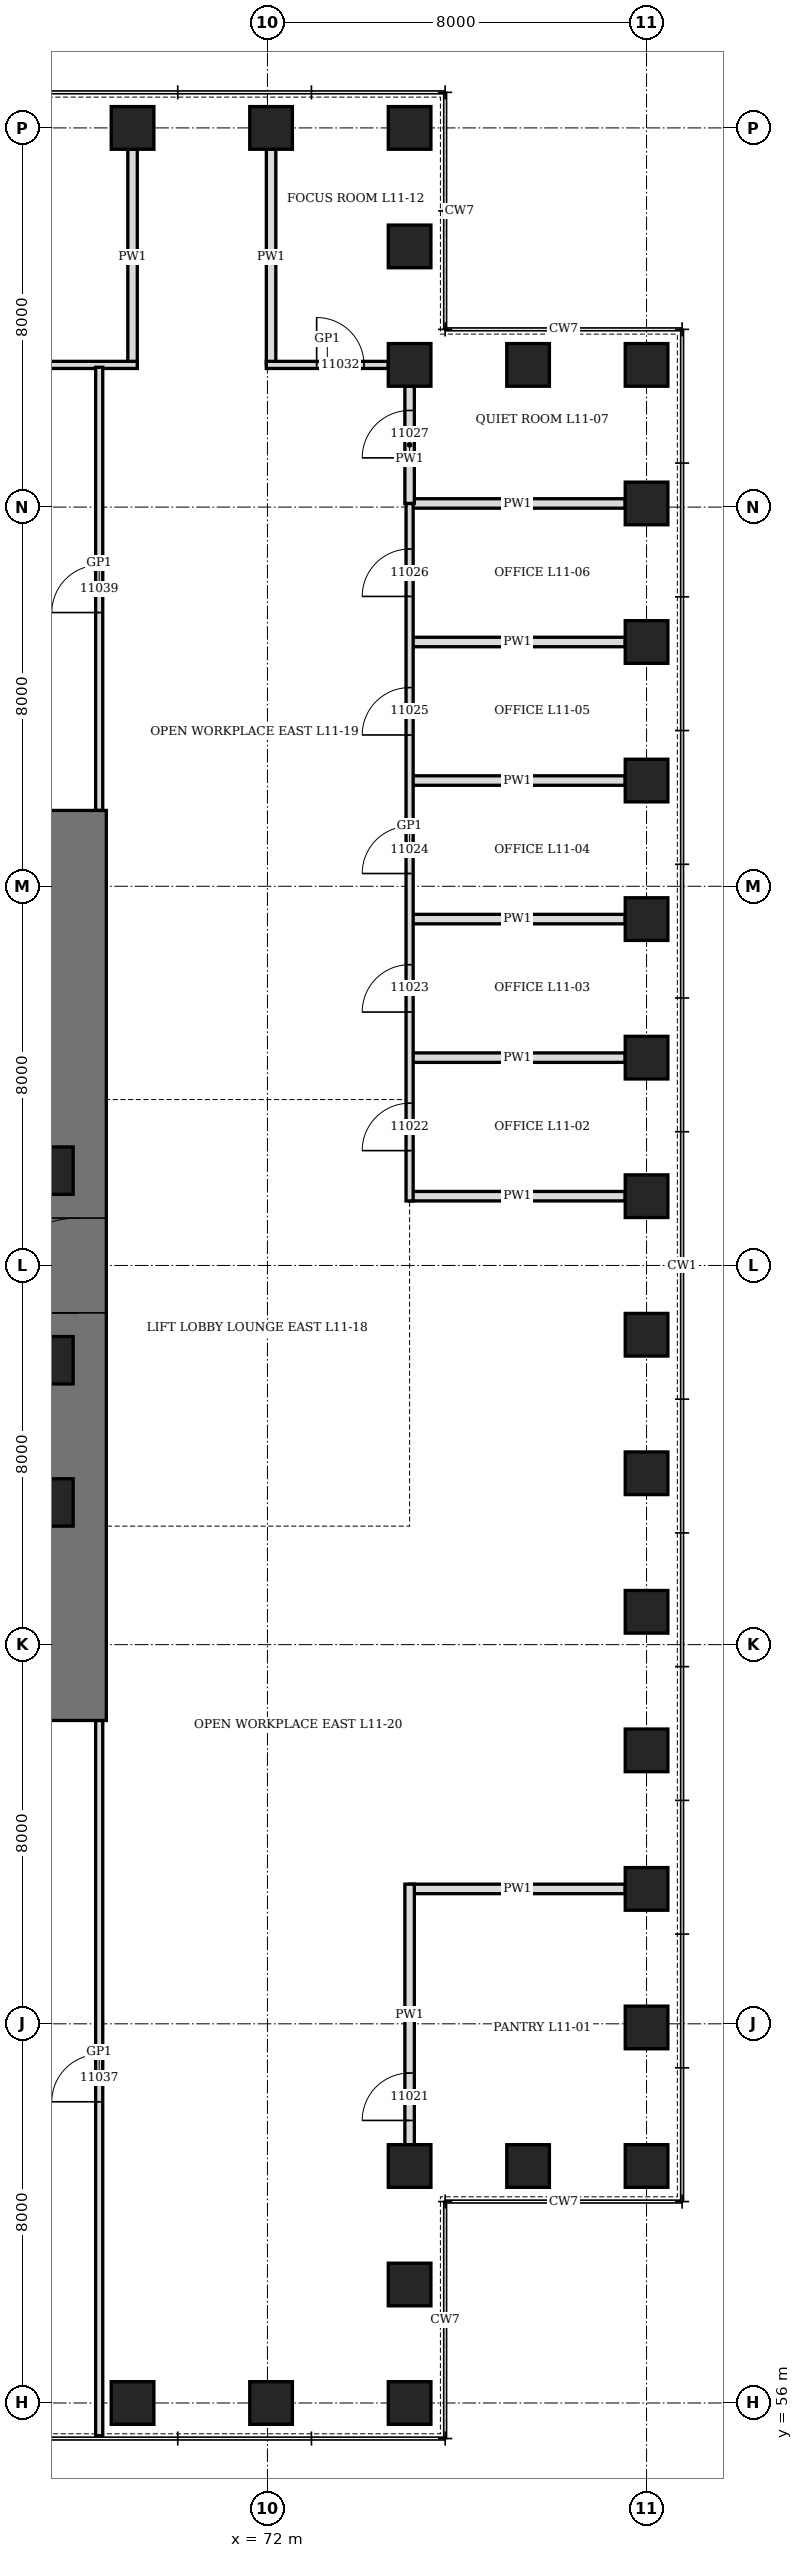
"""IFC4 building model, lengths in metres.
Left out: names, types, materials, properties, quantities, classifications, styles, units other than length and angle.
Written with IfcOpenShell. Run it as: python <this file> out.ifc"""

import sys

from ifc_helpers import new_model, si_unit, direction, frame, frame_2d, origin, origin_2d, place, context, subcontext, project, spatial, rectangle, hollow_rectangle, extrude, element, fill, save


model = new_model("IFC4")
c1 = context("Model", 3, precision=1e-05, world=origin(), true_north=direction((0.0, 1.0)))
c2 = subcontext(c1, "Body", "Model", "MODEL_VIEW")
j1 = project(units=[si_unit("LENGTHUNIT", "METRE"), si_unit("PLANEANGLEUNIT", "RADIAN")], contexts=[c1])
p1 = place(None, origin())
s1 = spatial("IfcSite", under=j1, at=p1, CompositionType="ELEMENT")
p2 = place(p1, origin())
s2 = spatial("IfcBuilding", under=s1, at=p2, CompositionType="ELEMENT")
p3 = place(p2, frame((0.0, 0.0, 55.9)))
s3 = spatial("IfcBuildingStorey", under=s2, at=p3, CompositionType="ELEMENT", Elevation=55.9)
for number, where, z_axis, x_axis in (
    (1, (69.154, 56.0, 0.0), (0.0, 0.0, 1.0), (1.0, 0.0, 0.0)),
    (2, (72.077, 56.0, 0.0), (0.0, 0.0, 1.0), (1.0, 0.0, 0.0)),
    (3, (75.0, 56.0, 0.0), (0.0, 0.0, 1.0), (0.0, 1.0, 0.0)),
    (4, (75.0, 58.5, 0.0), (0.0, 0.0, 1.0), (0.0, 1.0, 0.0)),
    (5, (75.0, 61.0, 0.0), (0.0, 0.0, 1.0), (1.0, 0.0, 0.0)),
    (6, (77.5, 61.0, 0.0), (0.0, 0.0, 1.0), (1.0, 0.0, 0.0)),
    (7, (80.0, 61.0, 0.0), (0.0, 0.0, 1.0), (0.0, 1.0, 0.0)),
    (8, (80.0, 63.923, 0.0), (0.0, 0.0, 1.0), (0.0, 1.0, 0.0)),
    (9, (80.0, 66.846, 0.0), (0.0, 0.0, 1.0), (0.0, 1.0, 0.0)),
    (10, (80.0, 69.769, 0.0), (0.0, 0.0, 1.0), (0.0, 1.0, 0.0)),
    (11, (80.0, 72.692, 0.0), (0.0, 0.0, 1.0), (0.0, 1.0, 0.0)),
    (12, (80.0, 75.615, 0.0), (0.0, 0.0, 1.0), (0.0, 1.0, 0.0)),
    (13, (80.0, 78.539, 0.0), (0.0, 0.0, 1.0), (0.0, 1.0, 0.0)),
    (14, (80.0, 81.461, 0.0), (0.0, 0.0, 1.0), (0.0, 1.0, 0.0)),
    (15, (80.0, 84.385, 0.0), (0.0, 0.0, 1.0), (0.0, 1.0, 0.0)),
    (16, (80.0, 87.308, 0.0), (0.0, 0.0, 1.0), (0.0, 1.0, 0.0)),
    (17, (80.0, 90.231, 0.0), (0.0, 0.0, 1.0), (0.0, 1.0, 0.0)),
    (18, (80.0, 93.154, 0.0), (0.0, 0.0, 1.0), (0.0, 1.0, 0.0)),
    (19, (80.0, 96.077, 0.0), (0.0, 0.0, 1.0), (0.0, 1.0, 0.0)),
    (20, (80.0, 99.0, 0.0), (0.0, 0.0, 1.0), (1.0, 0.0, 0.0)),
    (21, (77.5, 99.0, 0.0), (0.0, 0.0, 1.0), (1.0, 0.0, 0.0)),
    (22, (75.0, 99.0, 0.0), (0.0, 0.0, 1.0), (0.0, 1.0, 0.0)),
    (23, (75.0, 101.5, 0.0), (0.0, 0.0, 1.0), (0.0, 1.0, 0.0)),
    (24, (75.0, 104.0, 0.0), (0.0, 0.0, 1.0), (1.0, 0.0, 0.0)),
    (25, (72.077, 104.0, 0.0), (0.0, 0.0, 1.0), (1.0, 0.0, 0.0)),
    (26, (69.154, 104.0, 0.0), (0.0, 0.0, 1.0), (1.0, 0.0, 0.0)),
):
    element("IfcColumn", number, at=place(p3, frame(where, z_axis=z_axis, x_axis=x_axis)), inside=s3, PredefinedType="COLUMN", context=c2, shape_type="SweptSolid", body=[
        extrude(hollow_rectangle(XDim=0.9, YDim=0.9, WallThickness=0.12, at=origin_2d()), origin(), (0.0, 0.0, 1.0), 4.2),
    ])
p4 = place(p3, frame((68.0, 70.4, 0.0), z_axis=(0.0, 0.0, 1.0), x_axis=(0.0, 1.0, 0.0)))
e27 = element("IfcWall", 27, at=p4, inside=s3, PredefinedType="SHEAR", context=c2, shape_type="SweptSolid", body=[
    extrude(rectangle(XDim=19.2, YDim=1.2, at=frame_2d((9.6, 0.0))), origin(), (0.0, 0.0, 1.0), 4.2),
])
p5 = place(p4, frame((8.6, 0.0, 0.0)))
e28 = element("IfcOpeningElement", 28, at=p5, cuts=e27, PredefinedType="OPENING", context=c2, shape_type="SweptSolid", body=[
    extrude(rectangle(XDim=2.0, YDim=2.4, at=frame_2d((1.0, 1.2))), frame((0.0, 0.61, 0.0), z_axis=(0.0, -1.0, 0.0), x_axis=(1.0, 0.0, 0.0)), (0.0, 0.0, 1.0), 1.22),
])
for number, where, z_axis, x_axis in (
    (29, (67.4, 75.0, 0.0), (0.0, 0.0, 1.0), (1.0, 0.0, 0.0)),
    (30, (67.4, 78.0, 0.0), (0.0, 0.0, 1.0), (1.0, 0.0, 0.0)),
    (31, (67.4, 82.0, 0.0), (0.0, 0.0, 1.0), (1.0, 0.0, 0.0)),
):
    element("IfcColumn", number, at=place(p3, frame(where, z_axis=z_axis, x_axis=x_axis)), inside=s3, PredefinedType="COLUMN", context=c2, shape_type="SweptSolid", body=[
        extrude(hollow_rectangle(XDim=1.0, YDim=1.0, WallThickness=0.15, at=origin_2d()), origin(), (0.0, 0.0, 1.0), 4.2),
    ])
for number, where, z_axis, x_axis in (
    (32, (75.0, 66.846, 0.0), (0.0, 0.0, 1.0), (1.0, 0.0, 0.0)),
    (33, (75.0, 81.461, 0.0), (0.0, 0.0, 1.0), (1.0, 0.0, 0.0)),
    (34, (75.0, 84.385, 0.0), (0.0, 0.0, 1.0), (1.0, 0.0, 0.0)),
    (35, (75.0, 87.308, 0.0), (0.0, 0.0, 1.0), (1.0, 0.0, 0.0)),
    (36, (75.0, 90.231, 0.0), (0.0, 0.0, 1.0), (1.0, 0.0, 0.0)),
    (37, (75.0, 93.154, 0.0), (0.0, 0.0, 1.0), (1.0, 0.0, 0.0)),
    (38, (75.0, 96.077, 0.0), (0.0, 0.0, 1.0), (1.0, 0.0, 0.0)),
):
    element("IfcWall", number, at=place(p3, frame(where, z_axis=z_axis, x_axis=x_axis)), inside=s3, PredefinedType="PARTITIONING", context=c2, shape_type="SweptSolid", body=[
        extrude(rectangle(XDim=4.55, YDim=0.2, at=frame_2d((2.275, 0.0))), origin(), (0.0, 0.0, 1.0), 3.428),
    ])
p6 = place(p3, frame((69.154, 99.0, 0.0), z_axis=(0.0, 0.0, 1.0), x_axis=(0.0, 1.0, 0.0)))
e39 = element("IfcWall", 39, at=p6, inside=s3, PredefinedType="PARTITIONING", context=c2, shape_type="SweptSolid", body=[
    extrude(rectangle(XDim=4.55, YDim=0.2, at=frame_2d((2.275, 0.0))), origin(), (0.0, 0.0, 1.0), 3.278),
])
p7 = place(p3, frame((72.077, 99.0, 0.0), z_axis=(0.0, 0.0, 1.0), x_axis=(0.0, 1.0, 0.0)))
e40 = element("IfcWall", 40, at=p7, inside=s3, PredefinedType="PARTITIONING", context=c2, shape_type="SweptSolid", body=[
    extrude(rectangle(XDim=4.55, YDim=0.2, at=frame_2d((2.275, 0.0))), origin(), (0.0, 0.0, 1.0), 3.428),
])
p8 = place(p3, frame((60.285, 99.0, 0.0), z_axis=(0.0, 0.0, 1.0), x_axis=(1.0, 0.0, 0.0)))
e41 = element("IfcWall", 41, at=p8, inside=s3, PredefinedType="PARTITIONING", context=c2, shape_type="SweptSolid", body=[
    extrude(rectangle(XDim=8.969, YDim=0.15, at=frame_2d((4.485, 0.0))), origin(), (0.0, 0.0, 1.0), 4.04),
])
p9 = place(p8, frame((3.985, 0.0, 0.0)))
e42 = element("IfcOpeningElement", 42, at=p9, cuts=e41, PredefinedType="OPENING", context=c2, shape_type="SweptSolid", body=[
    extrude(rectangle(XDim=1.0, YDim=2.4, at=frame_2d((0.5, 1.2))), frame((0.0, 0.085, 0.0), z_axis=(0.0, -1.0, 0.0), x_axis=(1.0, 0.0, 0.0)), (0.0, 0.0, 1.0), 0.17),
])
p10 = place(p3, frame((71.977, 99.0, 0.0), z_axis=(0.0, 0.0, 1.0), x_axis=(1.0, 0.0, 0.0)))
e43 = element("IfcWall", 43, at=p10, inside=s3, PredefinedType="PARTITIONING", context=c2, shape_type="SweptSolid", body=[
    extrude(rectangle(XDim=2.573, YDim=0.15, at=frame_2d((1.287, 0.0))), origin(), (0.0, 0.0, 1.0), 4.04),
])
p11 = place(p10, frame((1.062, 0.0, 0.0)))
e44 = element("IfcOpeningElement", 44, at=p11, cuts=e43, PredefinedType="OPENING", context=c2, shape_type="SweptSolid", body=[
    extrude(rectangle(XDim=1.0, YDim=2.4, at=frame_2d((0.5, 1.2))), frame((0.0, 0.085, 0.0), z_axis=(0.0, -1.0, 0.0), x_axis=(1.0, 0.0, 0.0)), (0.0, 0.0, 1.0), 0.17),
])
p12 = place(p3, frame((68.45, 55.31, 0.0), z_axis=(0.0, 0.0, 1.0), x_axis=(0.0, 1.0, 0.0)))
e45 = element("IfcWall", 45, at=p12, inside=s3, PredefinedType="PARTITIONING", context=c2, shape_type="SweptSolid", body=[
    extrude(rectangle(XDim=15.09, YDim=0.15, at=frame_2d((7.545, 0.0))), origin(), (0.0, 0.0, 1.0), 4.04),
])
p13 = place(p12, frame((7.045, 0.0, 0.0)))
e46 = element("IfcOpeningElement", 46, at=p13, cuts=e45, PredefinedType="OPENING", context=c2, shape_type="SweptSolid", body=[
    extrude(rectangle(XDim=1.0, YDim=2.4, at=frame_2d((0.5, 1.2))), frame((0.0, 0.085, 0.0), z_axis=(0.0, -1.0, 0.0), x_axis=(1.0, 0.0, 0.0)), (0.0, 0.0, 1.0), 0.17),
])
p14 = place(p3, frame((68.45, 89.6, 0.0), z_axis=(0.0, 0.0, 1.0), x_axis=(0.0, 1.0, 0.0)))
e47 = element("IfcWall", 47, at=p14, inside=s3, PredefinedType="PARTITIONING", context=c2, shape_type="SweptSolid", body=[
    extrude(rectangle(XDim=9.35, YDim=0.15, at=frame_2d((4.675, 0.0))), origin(), (0.0, 0.0, 1.0), 4.04),
])
p15 = place(p14, frame((4.175, 0.0, 0.0)))
e48 = element("IfcOpeningElement", 48, at=p15, cuts=e47, PredefinedType="OPENING", context=c2, shape_type="SweptSolid", body=[
    extrude(rectangle(XDim=1.0, YDim=2.4, at=frame_2d((0.5, 1.2))), frame((0.0, 0.085, 0.0), z_axis=(0.0, -1.0, 0.0), x_axis=(1.0, 0.0, 0.0)), (0.0, 0.0, 1.0), 0.17),
])
p16 = place(p3, frame((75.0, 81.362, 0.0), z_axis=(0.0, 0.0, 1.0), x_axis=(0.0, 1.0, 0.0)))
e49 = element("IfcWall", 49, at=p16, inside=s3, PredefinedType="PARTITIONING", context=c2, shape_type="SweptSolid", body=[
    extrude(rectangle(XDim=14.715, YDim=0.15, at=frame_2d((7.358, 0.0))), origin(), (0.0, 0.0, 1.0), 4.04),
])
p17 = place(p16, frame((1.062, 0.0, 0.0)))
e50 = element("IfcOpeningElement", 50, at=p17, cuts=e49, PredefinedType="OPENING", context=c2, shape_type="SweptSolid", body=[
    extrude(rectangle(XDim=1.0, YDim=2.1, at=frame_2d((0.5, 1.05))), frame((0.0, 0.085, 0.0), z_axis=(0.0, -1.0, 0.0), x_axis=(1.0, 0.0, 0.0)), (0.0, 0.0, 1.0), 0.17),
])
p18 = place(p16, frame((3.985, 0.0, 0.0)))
e51 = element("IfcOpeningElement", 51, at=p18, cuts=e49, PredefinedType="OPENING", context=c2, shape_type="SweptSolid", body=[
    extrude(rectangle(XDim=1.0, YDim=2.1, at=frame_2d((0.5, 1.05))), frame((0.0, 0.085, 0.0), z_axis=(0.0, -1.0, 0.0), x_axis=(1.0, 0.0, 0.0)), (0.0, 0.0, 1.0), 0.17),
])
p19 = place(p16, frame((6.908, 0.0, 0.0)))
e52 = element("IfcOpeningElement", 52, at=p19, cuts=e49, PredefinedType="OPENING", context=c2, shape_type="SweptSolid", body=[
    extrude(rectangle(XDim=1.0, YDim=2.1, at=frame_2d((0.5, 1.05))), frame((0.0, 0.085, 0.0), z_axis=(0.0, -1.0, 0.0), x_axis=(1.0, 0.0, 0.0)), (0.0, 0.0, 1.0), 0.17),
])
p20 = place(p16, frame((9.831, 0.0, 0.0)))
e53 = element("IfcOpeningElement", 53, at=p20, cuts=e49, PredefinedType="OPENING", context=c2, shape_type="SweptSolid", body=[
    extrude(rectangle(XDim=1.0, YDim=2.1, at=frame_2d((0.5, 1.05))), frame((0.0, 0.085, 0.0), z_axis=(0.0, -1.0, 0.0), x_axis=(1.0, 0.0, 0.0)), (0.0, 0.0, 1.0), 0.17),
])
p21 = place(p16, frame((12.754, 0.0, 0.0)))
e54 = element("IfcOpeningElement", 54, at=p21, cuts=e49, PredefinedType="OPENING", context=c2, shape_type="SweptSolid", body=[
    extrude(rectangle(XDim=1.0, YDim=2.1, at=frame_2d((0.5, 1.05))), frame((0.0, 0.085, 0.0), z_axis=(0.0, -1.0, 0.0), x_axis=(1.0, 0.0, 0.0)), (0.0, 0.0, 1.0), 0.17),
])
p22 = place(p3, frame((75.0, 61.45, 0.0), z_axis=(0.0, 0.0, 1.0), x_axis=(0.0, 1.0, 0.0)))
e55 = element("IfcWall", 55, at=p22, inside=s3, PredefinedType="PARTITIONING", context=c2, shape_type="SweptSolid", body=[
    extrude(rectangle(XDim=5.496, YDim=0.2, at=frame_2d((2.748, 0.0))), origin(), (0.0, 0.0, 1.0), 4.04),
])
p23 = place(p22, frame((0.511, 0.0, 0.0)))
e56 = element("IfcOpeningElement", 56, at=p23, cuts=e55, PredefinedType="OPENING", context=c2, shape_type="SweptSolid", body=[
    extrude(rectangle(XDim=1.0, YDim=2.1, at=frame_2d((0.5, 1.05))), frame((0.0, 0.11, 0.0), z_axis=(0.0, -1.0, 0.0), x_axis=(1.0, 0.0, 0.0)), (0.0, 0.0, 1.0), 0.22),
])
p24 = place(p3, frame((75.0, 96.077, 0.0), z_axis=(0.0, 0.0, 1.0), x_axis=(0.0, 1.0, 0.0)))
e57 = element("IfcWall", 57, at=p24, inside=s3, PredefinedType="PARTITIONING", context=c2, shape_type="SweptSolid", body=[
    extrude(rectangle(XDim=2.473, YDim=0.2, at=frame_2d((1.237, 0.0))), origin(), (0.0, 0.0, 1.0), 4.04),
])
p25 = place(p24, frame((0.961, 0.0, 0.0)))
e58 = element("IfcOpeningElement", 58, at=p25, cuts=e57, PredefinedType="OPENING", context=c2, shape_type="SweptSolid", body=[
    extrude(rectangle(XDim=1.0, YDim=2.1, at=frame_2d((0.5, 1.05))), frame((0.0, 0.11, 0.0), z_axis=(0.0, -1.0, 0.0), x_axis=(1.0, 0.0, 0.0)), (0.0, 0.0, 1.0), 0.22),
])
p26 = place(p5, origin())
e59 = element("IfcDoor", 59, at=p26, inside=s3, OperationType="DOUBLE_DOOR_SINGLE_SWING", PredefinedType="DOOR", context=c2, shape_type="SweptSolid", body=[
    extrude(rectangle(XDim=2.0, YDim=2.4, at=frame_2d((1.0, 1.2))), frame((0.0, 0.35, 0.0), z_axis=(0.0, -1.0, 0.0), x_axis=(1.0, 0.0, 0.0)), (0.0, 0.0, 1.0), 0.7),
])
fill(e28, e59)
p27 = place(p23, origin())
e60 = element("IfcDoor", 60, at=p27, inside=s3, OperationType="SINGLE_SWING_LEFT", PredefinedType="DOOR", context=c2, shape_type="SweptSolid", body=[
    extrude(rectangle(XDim=1.0, YDim=2.1, at=frame_2d((0.5, 1.05))), frame((0.0, 0.1, 0.0), z_axis=(0.0, -1.0, 0.0), x_axis=(1.0, 0.0, 0.0)), (0.0, 0.0, 1.0), 0.199),
])
fill(e56, e60)
p28 = place(p17, origin())
e61 = element("IfcDoor", 61, at=p28, inside=s3, OperationType="SINGLE_SWING_LEFT", PredefinedType="DOOR", context=c2, shape_type="SweptSolid", body=[
    extrude(rectangle(XDim=1.0, YDim=2.1, at=frame_2d((0.5, 1.05))), frame((0.0, 0.075, 0.0), z_axis=(0.0, -1.0, 0.0), x_axis=(1.0, 0.0, 0.0)), (0.0, 0.0, 1.0), 0.149),
])
fill(e50, e61)
p29 = place(p18, origin())
e62 = element("IfcDoor", 62, at=p29, inside=s3, OperationType="SINGLE_SWING_LEFT", PredefinedType="DOOR", context=c2, shape_type="SweptSolid", body=[
    extrude(rectangle(XDim=1.0, YDim=2.1, at=frame_2d((0.5, 1.05))), frame((0.0, 0.075, 0.0), z_axis=(0.0, -1.0, 0.0), x_axis=(1.0, 0.0, 0.0)), (0.0, 0.0, 1.0), 0.149),
])
fill(e51, e62)
p30 = place(p19, origin())
e63 = element("IfcDoor", 63, at=p30, inside=s3, OperationType="SINGLE_SWING_LEFT", PredefinedType="DOOR", context=c2, shape_type="SweptSolid", body=[
    extrude(rectangle(XDim=1.0, YDim=2.1, at=frame_2d((0.5, 1.05))), frame((0.0, 0.075, 0.0), z_axis=(0.0, -1.0, 0.0), x_axis=(1.0, 0.0, 0.0)), (0.0, 0.0, 1.0), 0.149),
])
fill(e52, e63)
p31 = place(p20, origin())
e64 = element("IfcDoor", 64, at=p31, inside=s3, OperationType="SINGLE_SWING_LEFT", PredefinedType="DOOR", context=c2, shape_type="SweptSolid", body=[
    extrude(rectangle(XDim=1.0, YDim=2.1, at=frame_2d((0.5, 1.05))), frame((0.0, 0.075, 0.0), z_axis=(0.0, -1.0, 0.0), x_axis=(1.0, 0.0, 0.0)), (0.0, 0.0, 1.0), 0.149),
])
fill(e53, e64)
p32 = place(p21, origin())
e65 = element("IfcDoor", 65, at=p32, inside=s3, OperationType="SINGLE_SWING_LEFT", PredefinedType="DOOR", context=c2, shape_type="SweptSolid", body=[
    extrude(rectangle(XDim=1.0, YDim=2.1, at=frame_2d((0.5, 1.05))), frame((0.0, 0.075, 0.0), z_axis=(0.0, -1.0, 0.0), x_axis=(1.0, 0.0, 0.0)), (0.0, 0.0, 1.0), 0.149),
])
fill(e54, e65)
p33 = place(p25, origin())
e66 = element("IfcDoor", 66, at=p33, inside=s3, OperationType="SINGLE_SWING_LEFT", PredefinedType="DOOR", context=c2, shape_type="SweptSolid", body=[
    extrude(rectangle(XDim=1.0, YDim=2.1, at=frame_2d((0.5, 1.05))), frame((0.0, 0.1, 0.0), z_axis=(0.0, -1.0, 0.0), x_axis=(1.0, 0.0, 0.0)), (0.0, 0.0, 1.0), 0.199),
])
fill(e58, e66)
p34 = place(p11, origin())
e67 = element("IfcDoor", 67, at=p34, inside=s3, OperationType="SINGLE_SWING_RIGHT", PredefinedType="DOOR", context=c2, shape_type="SweptSolid", body=[
    extrude(rectangle(XDim=1.0, YDim=2.4, at=frame_2d((0.5, 1.2))), frame((0.0, 0.075, 0.0), z_axis=(0.0, -1.0, 0.0), x_axis=(1.0, 0.0, 0.0)), (0.0, 0.0, 1.0), 0.149),
])
fill(e44, e67)
p35 = place(p13, origin())
e68 = element("IfcDoor", 68, at=p35, inside=s3, OperationType="SINGLE_SWING_RIGHT", PredefinedType="DOOR", context=c2, shape_type="SweptSolid", body=[
    extrude(rectangle(XDim=1.0, YDim=2.4, at=frame_2d((0.5, 1.2))), frame((0.0, 0.075, 0.0), z_axis=(0.0, -1.0, 0.0), x_axis=(1.0, 0.0, 0.0)), (0.0, 0.0, 1.0), 0.149),
])
fill(e46, e68)
p36 = place(p15, origin())
e69 = element("IfcDoor", 69, at=p36, inside=s3, OperationType="SINGLE_SWING_RIGHT", PredefinedType="DOOR", context=c2, shape_type="SweptSolid", body=[
    extrude(rectangle(XDim=1.0, YDim=2.4, at=frame_2d((0.5, 1.2))), frame((0.0, 0.075, 0.0), z_axis=(0.0, -1.0, 0.0), x_axis=(1.0, 0.0, 0.0)), (0.0, 0.0, 1.0), 0.149),
])
fill(e48, e69)
save(model, sys.argv[1])
